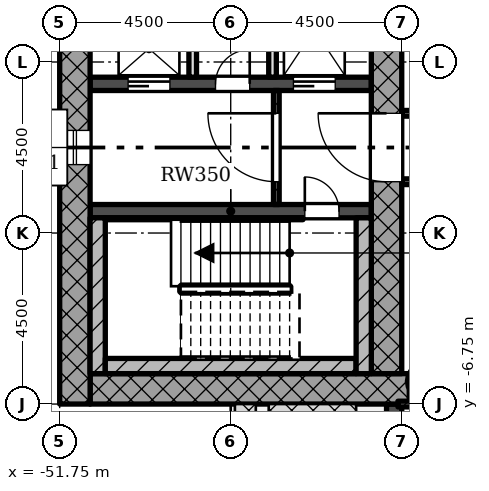
"""IFC4 building model, lengths in metres.
Left out: names, types, materials, properties, quantities, classifications, styles, units other than length and angle.
Written with IfcOpenShell. Run it as: python <this file> out.ifc"""

import sys

from ifc_helpers import new_model, si_unit, direction, frame, frame_2d, origin, origin_2d, place, context, subcontext, project, spatial, rectangle, hollow_circle, extrude, element, fill, save


model = new_model("IFC4")
c1 = context("Model", 3, precision=1e-05, world=origin(), true_north=direction((0.0, 1.0)))
c2 = subcontext(c1, "Body", "Model", "MODEL_VIEW")
j1 = project(units=[si_unit("LENGTHUNIT", "METRE"), si_unit("PLANEANGLEUNIT", "RADIAN")], contexts=[c1])
p1 = place(None, origin())
s1 = spatial("IfcSite", under=j1, at=p1, CompositionType="ELEMENT")
p2 = place(p1, origin())
s2 = spatial("IfcBuilding", under=s1, at=p2, CompositionType="ELEMENT")
p3 = place(p2, frame((0.0, 0.0, 181.3)))
s3 = spatial("IfcBuildingStorey", under=s2, at=p3, CompositionType="ELEMENT", Elevation=181.3)
p4 = place(p3, frame((-50.95, -6.35, 0.0), z_axis=(0.0, 0.0, 1.0), x_axis=(1.0, 0.0, 0.0)))
e1 = element("IfcWall", 1, at=p4, inside=s3, PredefinedType="SHEAR", context=c2, shape_type="SweptSolid", body=[
    extrude(rectangle(XDim=8.398, YDim=0.8, at=frame_2d((4.199, 0.0))), origin(), (0.0, 0.0, 1.0), 4.5),
])
p5 = place(p3, frame((-43.15, -5.95, 0.0), z_axis=(0.0, 0.0, 1.0), x_axis=(0.0, 1.0, 0.0)))
e2 = element("IfcWall", 2, at=p5, inside=s3, PredefinedType="SHEAR", context=c2, shape_type="SweptSolid", body=[
    extrude(rectangle(XDim=12.7, YDim=0.8, at=frame_2d((6.35, 0.0))), origin(), (0.0, 0.0, 1.0), 4.5),
])
p6 = place(p5, frame((5.05, 0.0, 0.0)))
e3 = element("IfcOpeningElement", 3, at=p6, cuts=e2, PredefinedType="OPENING", context=c2, shape_type="SweptSolid", body=[
    extrude(rectangle(XDim=1.8, YDim=2.1, at=frame_2d((0.9, 1.05))), frame((0.0, 0.41, 0.0), z_axis=(0.0, -1.0, 0.0), x_axis=(1.0, 0.0, 0.0)), (0.0, 0.0, 1.0), 0.82),
])
p7 = place(p3, frame((-51.35, 5.95, 0.0), z_axis=(0.0, 0.0, 1.0), x_axis=(0.0, -1.0, 0.0)))
e4 = element("IfcWall", 4, at=p7, inside=s3, PredefinedType="SHEAR", context=c2, shape_type="SweptSolid", body=[
    extrude(rectangle(XDim=12.7, YDim=0.8, at=frame_2d((6.35, 0.0))), origin(), (0.0, 0.0, 1.0), 4.5),
])
p8 = place(p7, frame((5.5, 0.0, 0.45)))
e5 = element("IfcOpeningElement", 5, at=p8, cuts=e4, PredefinedType="OPENING", context=c2, shape_type="SweptSolid", body=[
    extrude(rectangle(XDim=0.9, YDim=2.4, at=frame_2d((0.45, 1.2))), frame((0.0, 0.41, 0.0), z_axis=(0.0, -1.0, 0.0), x_axis=(1.0, 0.0, 0.0)), (0.0, 0.0, 1.0), 0.82),
])
p9 = place(p3, frame((-50.95, -1.675, 0.0), z_axis=(0.0, 0.0, 1.0), x_axis=(1.0, 0.0, 0.0)))
e6 = element("IfcWall", 6, at=p9, inside=s3, PredefinedType="SHEAR", context=c2, shape_type="SweptSolid", body=[
    extrude(rectangle(XDim=7.4, YDim=0.35, at=frame_2d((3.7, 0.0))), origin(), (0.0, 0.0, 1.0), 4.5),
])
p10 = place(p9, frame((5.65, 0.0, 0.0)))
e7 = element("IfcOpeningElement", 7, at=p10, cuts=e6, PredefinedType="OPENING", context=c2, shape_type="SweptSolid", body=[
    extrude(rectangle(XDim=0.9, YDim=2.1, at=frame_2d((0.45, 1.05))), frame((0.0, 0.185, 0.0), z_axis=(0.0, -1.0, 0.0), x_axis=(1.0, 0.0, 0.0)), (0.0, 0.0, 1.0), 0.37),
])
p11 = place(p3, frame((-50.95, 1.675, 0.0), z_axis=(0.0, 0.0, 1.0), x_axis=(1.0, 0.0, 0.0)))
e8 = element("IfcWall", 8, at=p11, inside=s3, PredefinedType="SHEAR", context=c2, shape_type="SweptSolid", body=[
    extrude(rectangle(XDim=7.4, YDim=0.35, at=frame_2d((3.7, 0.0))), origin(), (0.0, 0.0, 1.0), 4.5),
])
p12 = place(p11, frame((5.35, 0.0, 0.0)))
e9 = element("IfcOpeningElement", 9, at=p12, cuts=e8, PredefinedType="OPENING", context=c2, shape_type="SweptSolid", body=[
    extrude(rectangle(XDim=1.1, YDim=2.1, at=frame_2d((0.55, 1.05))), frame((0.0, 0.185, 0.0), z_axis=(0.0, -1.0, 0.0), x_axis=(1.0, 0.0, 0.0)), (0.0, 0.0, 1.0), 0.37),
])
p13 = place(p11, frame((1.0, 0.0, 0.0)))
e10 = element("IfcOpeningElement", 10, at=p13, cuts=e8, PredefinedType="OPENING", context=c2, shape_type="SweptSolid", body=[
    extrude(rectangle(XDim=1.1, YDim=2.1, at=frame_2d((0.55, 1.05))), frame((0.0, 0.185, 0.0), z_axis=(0.0, -1.0, 0.0), x_axis=(1.0, 0.0, 0.0)), (0.0, 0.0, 1.0), 0.37),
])
p14 = place(p11, frame((3.3, 0.0, 0.0)))
e11 = element("IfcOpeningElement", 11, at=p14, cuts=e8, PredefinedType="OPENING", context=c2, shape_type="SweptSolid", body=[
    extrude(rectangle(XDim=0.9, YDim=2.1, at=frame_2d((0.45, 1.05))), frame((0.0, 0.185, 0.0), z_axis=(0.0, -1.0, 0.0), x_axis=(1.0, 0.0, 0.0)), (0.0, 0.0, 1.0), 0.37),
])
p15 = place(p3, frame((-42.15, -6.15, 0.0), z_axis=(0.0, 0.0, 1.0), x_axis=(1.0, 0.0, 0.0)))
e12 = element("IfcColumn", 12, at=p15, inside=s3, PredefinedType="COLUMN", context=c2, shape_type="SweptSolid", body=[
    extrude(hollow_circle(Radius=0.45, WallThickness=0.032, at=origin_2d()), origin(), (0.0, 0.0, 1.0), 4.5),
])
p16 = place(p3, frame((-42.95, -6.75, -0.02), z_axis=(0.0, 0.0, 1.0), x_axis=(0.0, -1.0, 0.0)))
e13 = element("IfcWall", 13, at=p16, inside=s3, PredefinedType="STANDARD", context=c2, shape_type="SweptSolid", body=[
    extrude(rectangle(XDim=4.5, YDim=0.4, at=frame_2d((2.25, 0.0))), origin(), (0.0, 0.0, 1.0), 4.22),
])
p17 = place(p16, frame((1.35, 0.0, 0.02)))
e14 = element("IfcOpeningElement", 14, at=p17, cuts=e13, PredefinedType="OPENING", context=c2, shape_type="SweptSolid", body=[
    extrude(rectangle(XDim=1.8, YDim=2.1, at=frame_2d((0.9, 1.05))), frame((0.0, 0.21, 0.0), z_axis=(0.0, -1.0, 0.0), x_axis=(1.0, 0.0, 0.0)), (0.0, 0.0, 1.0), 0.42),
])
p18 = place(p3, frame((-46.05, 1.5, 0.0), z_axis=(0.0, 0.0, 1.0), x_axis=(0.0, -1.0, 0.0)))
e15 = element("IfcWall", 15, at=p18, inside=s3, PredefinedType="PARTITIONING", context=c2, shape_type="SweptSolid", body=[
    extrude(rectangle(XDim=3.0, YDim=0.15, at=frame_2d((1.5, 0.0))), origin(), (0.0, 0.0, 1.0), 4.08),
])
p19 = place(p18, frame((0.6, 0.0, 0.0)))
e16 = element("IfcOpeningElement", 16, at=p19, cuts=e15, PredefinedType="OPENING", context=c2, shape_type="SweptSolid", body=[
    extrude(rectangle(XDim=1.8, YDim=2.1, at=frame_2d((0.9, 1.05))), frame((0.0, 0.085, 0.0), z_axis=(0.0, -1.0, 0.0), x_axis=(1.0, 0.0, 0.0)), (0.0, 0.0, 1.0), 0.17),
])
for number, where, z_axis, x_axis in (
    (17, (-48.25, 5.95, 0.0), (0.0, 0.0, 1.0), (0.0, -1.0, 0.0)),
    (18, (-46.15, 5.95, 0.0), (0.0, 0.0, 1.0), (0.0, -1.0, 0.0)),
):
    element("IfcWall", number, at=place(p3, frame(where, z_axis=z_axis, x_axis=x_axis)), inside=s3, PredefinedType="SOLIDWALL", context=c2, shape_type="SweptSolid", body=[
        extrude(rectangle(XDim=4.1, YDim=0.2, at=frame_2d((2.05, 0.0))), origin(), (0.0, 0.0, 1.0), 4.08),
    ])
p20 = place(p3, frame((-42.75, 0.9, 0.0), z_axis=(0.0, 0.0, 1.0), x_axis=(1.0, 0.0, 0.0)))
e19 = element("IfcWall", 19, at=p20, inside=s3, PredefinedType="PARTITIONING", context=c2, shape_type="SweptSolid", body=[
    extrude(rectangle(XDim=5.85, YDim=0.15, at=frame_2d((2.925, 0.0))), origin(), (0.0, 0.0, 1.0), 4.08),
])
p21 = place(p20, frame((2.475, 0.0, 0.0)))
e20 = element("IfcOpeningElement", 20, at=p21, cuts=e19, PredefinedType="OPENING", context=c2, shape_type="SweptSolid", body=[
    extrude(rectangle(XDim=0.9, YDim=2.1, at=frame_2d((0.45, 1.05))), frame((0.0, 0.085, 0.0), z_axis=(0.0, -1.0, 0.0), x_axis=(1.0, 0.0, 0.0)), (0.0, 0.0, 1.0), 0.17),
])
p22 = place(p3, frame((-42.75, -0.9, 0.0), z_axis=(0.0, 0.0, 1.0), x_axis=(1.0, 0.0, 0.0)))
e21 = element("IfcWall", 21, at=p22, inside=s3, PredefinedType="PARTITIONING", context=c2, shape_type="SweptSolid", body=[
    extrude(rectangle(XDim=5.85, YDim=0.15, at=frame_2d((2.925, 0.0))), origin(), (0.0, 0.0, 1.0), 4.08),
])
p23 = place(p22, frame((2.475, 0.0, 0.0)))
e22 = element("IfcOpeningElement", 22, at=p23, cuts=e21, PredefinedType="OPENING", context=c2, shape_type="SweptSolid", body=[
    extrude(rectangle(XDim=0.9, YDim=2.1, at=frame_2d((0.45, 1.05))), frame((0.0, 0.085, 0.0), z_axis=(0.0, -1.0, 0.0), x_axis=(1.0, 0.0, 0.0)), (0.0, 0.0, 1.0), 0.17),
])
p24 = place(p3, frame((-42.85, -6.75, 0.0), z_axis=(0.0, 0.0, 1.0), x_axis=(1.0, 0.0, 0.0)))
e23 = element("IfcWall", 23, at=p24, inside=s3, PredefinedType="PARTITIONING", context=c2, shape_type="SweptSolid", body=[
    extrude(rectangle(XDim=13.7, YDim=0.15, at=frame_2d((6.85, 0.0))), origin(), (0.0, 0.0, 1.0), 4.08),
])
p25 = place(p24, frame((5.95, 0.0, 0.0)))
e24 = element("IfcOpeningElement", 24, at=p25, cuts=e23, PredefinedType="OPENING", context=c2, shape_type="SweptSolid", body=[
    extrude(rectangle(XDim=1.8, YDim=2.1, at=frame_2d((0.9, 1.05))), frame((0.0, 0.085, 0.0), z_axis=(0.0, -1.0, 0.0), x_axis=(1.0, 0.0, 0.0)), (0.0, 0.0, 1.0), 0.17),
])
p26 = place(p3, frame((-50.75, -1.85, 0.0), z_axis=(0.0, 0.0, 1.0), x_axis=(0.0, -1.0, 0.0)))
e25 = element("IfcWall", 25, at=p26, inside=s3, PredefinedType="SHEAR", context=c2, shape_type="SweptSolid", body=[
    extrude(rectangle(XDim=4.1, YDim=0.4, at=frame_2d((2.05, 0.0))), origin(), (0.0, 0.0, 1.0), 4.5),
])
p27 = place(p3, frame((-43.95, -5.75, 0.0), z_axis=(0.0, 0.0, 1.0), x_axis=(-1.0, 0.0, 0.0)))
e26 = element("IfcWall", 26, at=p27, inside=s3, PredefinedType="SHEAR", context=c2, shape_type="SweptSolid", body=[
    extrude(rectangle(XDim=6.6, YDim=0.4, at=frame_2d((3.3, 0.0))), origin(), (0.0, 0.0, 1.0), 4.5),
])
p28 = place(p3, frame((-43.75, -1.85, 0.0), z_axis=(0.0, 0.0, 1.0), x_axis=(0.0, -1.0, 0.0)))
e27 = element("IfcWall", 27, at=p28, inside=s3, PredefinedType="SHEAR", context=c2, shape_type="SweptSolid", body=[
    extrude(rectangle(XDim=4.1, YDim=0.4, at=frame_2d((2.05, 0.0))), origin(), (0.0, 0.0, 1.0), 4.5),
])
p29 = place(p3, frame((-45.35, -1.875, 0.0), z_axis=(0.0, 0.0, 1.0), x_axis=(-1.0, 0.0, 0.0)))
e28 = element("IfcWall", 28, at=p29, inside=s3, PredefinedType="SHEAR", context=c2, shape_type="SweptSolid", body=[
    extrude(rectangle(XDim=5.2, YDim=0.05, at=frame_2d((2.6, 0.0))), origin(), (0.0, 0.0, 1.0), 4.5),
])
p30 = place(p8, origin())
e29 = element("IfcWindow", 29, at=p30, inside=s3, PartitioningType="SINGLE_PANEL", PredefinedType="WINDOW", context=c2, shape_type="SweptSolid", body=[
    extrude(rectangle(XDim=0.9, YDim=2.4, at=frame_2d((0.45, 1.2))), frame((0.0, 0.03, 0.0), z_axis=(0.0, -1.0, 0.0), x_axis=(1.0, 0.0, 0.0)), (0.0, 0.0, 1.0), 0.06),
])
fill(e5, e29)
p31 = place(p19, origin())
e30 = element("IfcDoor", 30, at=p31, inside=s3, OperationType="SINGLE_SWING_LEFT", PredefinedType="DOOR", context=c2, shape_type="SweptSolid", body=[
    extrude(rectangle(XDim=1.8, YDim=2.1, at=frame_2d((0.9, 1.05))), frame((0.0, 0.025, 0.0), z_axis=(0.0, -1.0, 0.0), x_axis=(1.0, 0.0, 0.0)), (0.0, 0.0, 1.0), 0.05),
])
fill(e16, e30)
p32 = place(p10, origin())
e31 = element("IfcDoor", 31, at=p32, inside=s3, OperationType="SINGLE_SWING_RIGHT", PredefinedType="DOOR", context=c2, shape_type="SweptSolid", body=[
    extrude(rectangle(XDim=0.9, YDim=2.1, at=frame_2d((0.45, 1.05))), frame((0.0, 0.025, 0.0), z_axis=(0.0, -1.0, 0.0), x_axis=(1.0, 0.0, 0.0)), (0.0, 0.0, 1.0), 0.05),
])
fill(e7, e31)
p33 = place(p12, origin())
e32 = element("IfcDoor", 32, at=p33, inside=s3, OperationType="SLIDING_TO_LEFT", PredefinedType="DOOR", context=c2, shape_type="SweptSolid", body=[
    extrude(rectangle(XDim=1.1, YDim=2.1, at=frame_2d((0.55, 1.05))), frame((0.0, 0.025, 0.0), z_axis=(0.0, -1.0, 0.0), x_axis=(1.0, 0.0, 0.0)), (0.0, 0.0, 1.0), 0.05),
])
fill(e9, e32)
p34 = place(p13, origin())
e33 = element("IfcDoor", 33, at=p34, inside=s3, OperationType="SLIDING_TO_LEFT", PredefinedType="DOOR", context=c2, shape_type="SweptSolid", body=[
    extrude(rectangle(XDim=1.1, YDim=2.1, at=frame_2d((0.55, 1.05))), frame((0.0, 0.025, 0.0), z_axis=(0.0, -1.0, 0.0), x_axis=(1.0, 0.0, 0.0)), (0.0, 0.0, 1.0), 0.05),
])
fill(e10, e33)
p35 = place(p14, origin())
e34 = element("IfcDoor", 34, at=p35, inside=s3, OperationType="SINGLE_SWING_LEFT", PredefinedType="DOOR", context=c2, shape_type="SweptSolid", body=[
    extrude(rectangle(XDim=0.9, YDim=2.1, at=frame_2d((0.45, 1.05))), frame((0.0, 0.025, 0.0), z_axis=(0.0, -1.0, 0.0), x_axis=(1.0, 0.0, 0.0)), (0.0, 0.0, 1.0), 0.05),
])
fill(e11, e34)
p36 = place(p6, origin())
e35 = element("IfcDoor", 35, at=p36, inside=s3, OperationType="SINGLE_SWING_LEFT", PredefinedType="DOOR", context=c2, shape_type="SweptSolid", body=[
    extrude(rectangle(XDim=1.8, YDim=2.1, at=frame_2d((0.9, 1.05))), frame((0.0, 0.025, 0.0), z_axis=(0.0, -1.0, 0.0), x_axis=(1.0, 0.0, 0.0)), (0.0, 0.0, 1.0), 0.05),
])
fill(e3, e35)
save(model, sys.argv[1])
